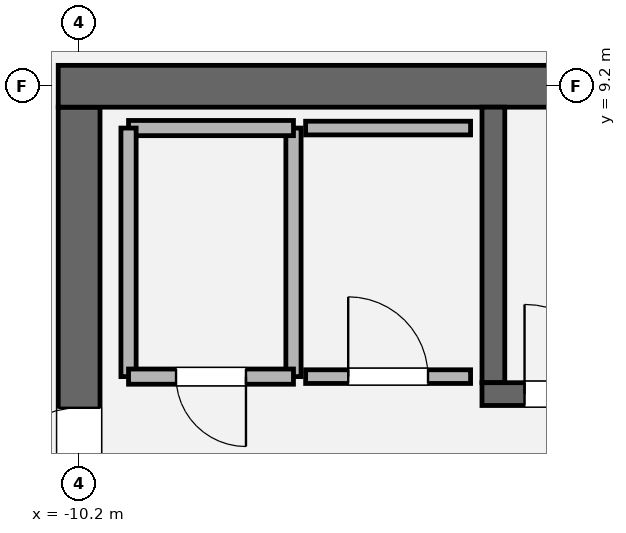
"""IFC4 building model, lengths in metres.
Left out: names, types, materials, properties, quantities, classifications, styles, units other than length and angle.
Written with IfcOpenShell. Run it as: python <this file> out.ifc"""

import sys

from ifc_helpers import new_model, si_unit, direction, frame, frame_2d, origin, place, context, subcontext, project, spatial, rectangle, extrude, element, fill, save


model = new_model("IFC4")
c1 = context("Model", 3, precision=1e-05, world=origin(), true_north=direction((0.0, 1.0)))
c2 = subcontext(c1, "Body", "Model", "MODEL_VIEW")
j1 = project(units=[si_unit("LENGTHUNIT", "METRE"), si_unit("PLANEANGLEUNIT", "RADIAN")], contexts=[c1])
p1 = place(None, origin())
s1 = spatial("IfcSite", under=j1, at=p1, CompositionType="ELEMENT")
p2 = place(p1, origin())
s2 = spatial("IfcBuilding", under=s1, at=p2, CompositionType="ELEMENT")
p3 = place(p2, frame((0.0, 0.0, 279.75)))
s3 = spatial("IfcBuildingStorey", under=s2, at=p3, CompositionType="ELEMENT", Elevation=279.75)
p4 = place(p3, frame((-10.2, -8.925, 0.0), z_axis=(0.0, 0.0, 1.0), x_axis=(0.0, 1.0, 0.0)))
e1 = element("IfcWall", 1, at=p4, inside=s3, PredefinedType="SHEAR", context=c2, shape_type="SweptSolid", body=[
    extrude(rectangle(XDim=17.85, YDim=0.55, at=frame_2d((8.925, 0.0))), origin(), (0.0, 0.0, 1.0), 4.05),
])
p5 = place(p4, frame((12.715, 0.0, 0.0)))
e2 = element("IfcOpeningElement", 2, at=p5, cuts=e1, PredefinedType="OPENING", context=c2, shape_type="SweptSolid", body=[
    extrude(rectangle(XDim=1.18, YDim=2.2, at=frame_2d((0.59, 1.1))), frame((0.0, 0.285, 0.0), z_axis=(0.0, -1.0, 0.0), x_axis=(1.0, 0.0, 0.0)), (0.0, 0.0, 1.0), 0.57),
])
p6 = place(p3, frame((-10.475, 9.2, 0.0), z_axis=(0.0, 0.0, 1.0), x_axis=(1.0, 0.0, 0.0)))
e3 = element("IfcWall", 3, at=p6, inside=s3, PredefinedType="SHEAR", context=c2, shape_type="SweptSolid", body=[
    extrude(rectangle(XDim=20.95, YDim=0.55, at=frame_2d((10.475, 0.0))), origin(), (0.0, 0.0, 1.0), 4.05),
])
p7 = place(p3, frame((-4.75, 5.3, 0.0), z_axis=(0.0, 0.0, 1.0), x_axis=(0.0, 1.0, 0.0)))
e4 = element("IfcWall", 4, at=p7, inside=s3, PredefinedType="SOLIDWALL", context=c2, shape_type="SweptSolid", body=[
    extrude(rectangle(XDim=3.625, YDim=0.3, at=frame_2d((1.812, 0.0))), origin(), (0.0, 0.0, 1.0), 4.05),
])
p8 = place(p3, frame((-4.9, 5.15, 0.0), z_axis=(0.0, 0.0, 1.0), x_axis=(1.0, 0.0, 0.0)))
e5 = element("IfcWall", 5, at=p8, inside=s3, PredefinedType="SOLIDWALL", context=c2, shape_type="SweptSolid", body=[
    extrude(rectangle(XDim=9.8, YDim=0.3, at=frame_2d((4.9, 0.0))), origin(), (0.0, 0.0, 1.0), 4.05),
])
p9 = place(p8, frame((0.56, 0.0, 0.0)))
e6 = element("IfcOpeningElement", 6, at=p9, cuts=e5, PredefinedType="OPENING", context=c2, shape_type="SweptSolid", body=[
    extrude(rectangle(XDim=1.18, YDim=2.2, at=frame_2d((0.59, 1.1))), frame((0.0, 0.16, 0.0), z_axis=(0.0, -1.0, 0.0), x_axis=(1.0, 0.0, 0.0)), (0.0, 0.0, 1.0), 0.32),
])
p10 = place(p3, frame((-7.38, 5.38, 0.0), z_axis=(0.0, 0.0, 1.0), x_axis=(0.0, 1.0, 0.0)))
e7 = element("IfcWall", 7, at=p10, inside=s3, PredefinedType="SOLIDWALL", context=c2, shape_type="SweptSolid", body=[
    extrude(rectangle(XDim=3.27, YDim=0.2, at=frame_2d((1.635, 0.0))), origin(), (0.0, 0.0, 1.0), 3.77),
])
p11 = place(p3, frame((-7.38, 8.65, 0.0), z_axis=(0.0, 0.0, 1.0), x_axis=(-1.0, 0.0, 0.0)))
e8 = element("IfcWall", 8, at=p11, inside=s3, PredefinedType="SOLIDWALL", context=c2, shape_type="SweptSolid", body=[
    extrude(rectangle(XDim=2.17, YDim=0.2, at=frame_2d((1.085, 0.0))), origin(), (0.0, 0.0, 1.0), 3.77),
])
p12 = place(p3, frame((-9.55, 8.65, 0.0), z_axis=(0.0, 0.0, 1.0), x_axis=(0.0, -1.0, 0.0)))
e9 = element("IfcWall", 9, at=p12, inside=s3, PredefinedType="SOLIDWALL", context=c2, shape_type="SweptSolid", body=[
    extrude(rectangle(XDim=3.27, YDim=0.2, at=frame_2d((1.635, 0.0))), origin(), (0.0, 0.0, 1.0), 3.77),
])
p13 = place(p3, frame((-9.55, 5.38, 0.0), z_axis=(0.0, 0.0, 1.0), x_axis=(1.0, 0.0, 0.0)))
e10 = element("IfcWall", 10, at=p13, inside=s3, PredefinedType="SOLIDWALL", context=c2, shape_type="SweptSolid", body=[
    extrude(rectangle(XDim=2.17, YDim=0.2, at=frame_2d((1.085, 0.0))), origin(), (0.0, 0.0, 1.0), 3.77),
])
p14 = place(p13, frame((0.625, 0.0, 0.0)))
e11 = element("IfcOpeningElement", 11, at=p14, cuts=e10, PredefinedType="OPENING", context=c2, shape_type="SweptSolid", body=[
    extrude(rectangle(XDim=0.92, YDim=2.1, at=frame_2d((0.46, 1.05))), frame((0.0, 0.11, 0.0), z_axis=(0.0, -1.0, 0.0), x_axis=(1.0, 0.0, 0.0)), (0.0, 0.0, 1.0), 0.22),
])
p15 = place(p3, frame((-5.05, 8.65, 0.0), z_axis=(0.0, 0.0, 1.0), x_axis=(-1.0, 0.0, 0.0)))
e12 = element("IfcWall", 12, at=p15, inside=s3, PredefinedType="PARTITIONING", context=c2, shape_type="SweptSolid", body=[
    extrude(rectangle(XDim=2.17, YDim=0.18, at=frame_2d((1.085, 0.0))), origin(), (0.0, 0.0, 1.0), 3.77),
])
p16 = place(p3, frame((-7.22, 5.38, 0.0), z_axis=(0.0, 0.0, 1.0), x_axis=(1.0, 0.0, 0.0)))
e13 = element("IfcWall", 13, at=p16, inside=s3, PredefinedType="PARTITIONING", context=c2, shape_type="SweptSolid", body=[
    extrude(rectangle(XDim=2.17, YDim=0.18, at=frame_2d((1.085, 0.0))), origin(), (0.0, 0.0, 1.0), 3.77),
])
p17 = place(p16, frame((0.56, 0.0, 0.0)))
e14 = element("IfcOpeningElement", 14, at=p17, cuts=e13, PredefinedType="OPENING", context=c2, shape_type="SweptSolid", body=[
    extrude(rectangle(XDim=1.05, YDim=2.2, at=frame_2d((0.525, 1.1))), frame((0.0, 0.1, 0.0), z_axis=(0.0, -1.0, 0.0), x_axis=(1.0, 0.0, 0.0)), (0.0, 0.0, 1.0), 0.2),
])
p18 = place(p9, origin())
e15 = element("IfcDoor", 15, at=p18, inside=s3, OperationType="SINGLE_SWING_LEFT", PredefinedType="DOOR", context=c2, shape_type="SweptSolid", body=[
    extrude(rectangle(XDim=1.18, YDim=2.2, at=frame_2d((0.59, 1.1))), frame((0.0, 0.025, 0.0), z_axis=(0.0, -1.0, 0.0), x_axis=(1.0, 0.0, 0.0)), (0.0, 0.0, 1.0), 0.05),
])
fill(e6, e15)
p19 = place(p5, origin())
e16 = element("IfcDoor", 16, at=p19, inside=s3, OperationType="SINGLE_SWING_LEFT", PredefinedType="DOOR", context=c2, shape_type="SweptSolid", body=[
    extrude(rectangle(XDim=1.18, YDim=2.2, at=frame_2d((0.59, 1.1))), frame((0.0, 0.025, 0.0), z_axis=(0.0, -1.0, 0.0), x_axis=(1.0, 0.0, 0.0)), (0.0, 0.0, 1.0), 0.05),
])
fill(e2, e16)
p20 = place(p14, origin())
e17 = element("IfcDoor", 17, at=p20, inside=s3, OperationType="SINGLE_SWING_RIGHT", PredefinedType="DOOR", context=c2, shape_type="SweptSolid", body=[
    extrude(rectangle(XDim=0.92, YDim=2.1, at=frame_2d((0.46, 1.05))), frame((0.0, 0.025, 0.0), z_axis=(0.0, -1.0, 0.0), x_axis=(1.0, 0.0, 0.0)), (0.0, 0.0, 1.0), 0.05),
])
fill(e11, e17)
p21 = place(p17, origin())
e18 = element("IfcDoor", 18, at=p21, inside=s3, OperationType="SINGLE_SWING_LEFT", PredefinedType="DOOR", context=c2, shape_type="SweptSolid", body=[
    extrude(rectangle(XDim=1.05, YDim=2.2, at=frame_2d((0.525, 1.1))), frame((0.0, 0.025, 0.0), z_axis=(0.0, -1.0, 0.0), x_axis=(1.0, 0.0, 0.0)), (0.0, 0.0, 1.0), 0.05),
])
fill(e14, e18)
save(model, sys.argv[1])
